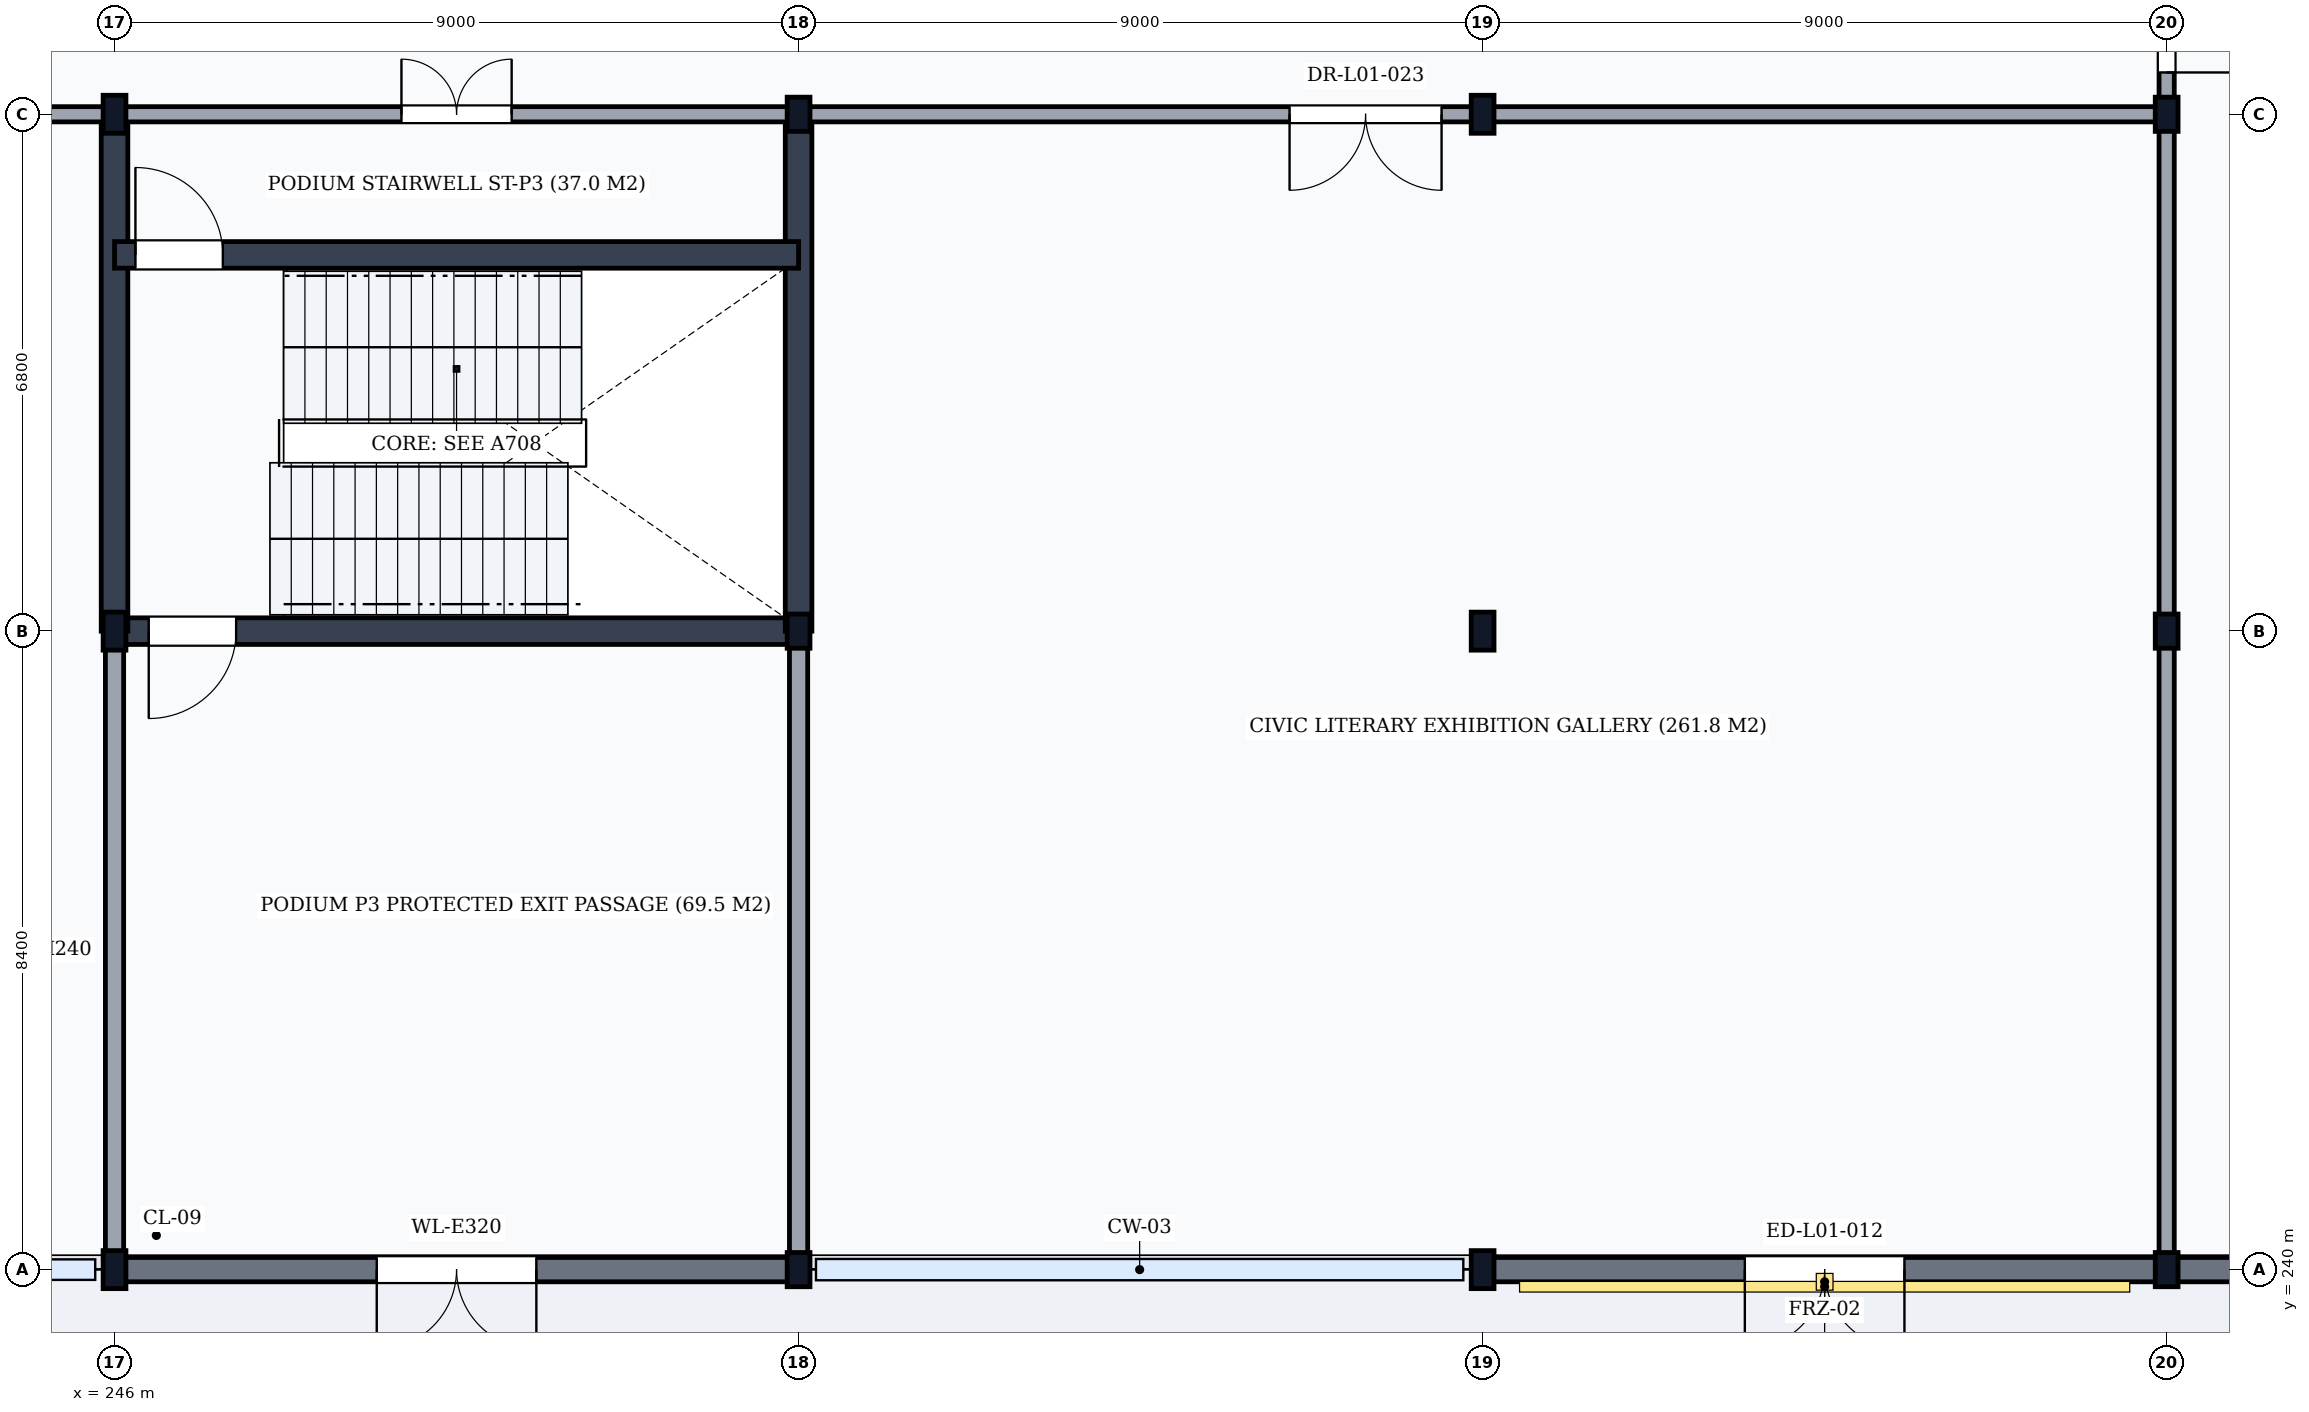
"""IFC4 building model, lengths in metres.
Left out: names, types, materials, properties, quantities, classifications, styles, units other than length and angle.
Written with IfcOpenShell. Run it as: python <this file> out.ifc"""

import sys

from ifc_helpers import new_model, si_unit, direction, frame, frame_2d, origin, origin_2d, place, context, subcontext, project, spatial, rectangle, i_section, extrude, element, fill, save


model = new_model("IFC4")
c1 = context("Model", 3, precision=1e-05, world=origin(), true_north=direction((0.0, 1.0)))
c2 = subcontext(c1, "Body", "Model", "MODEL_VIEW")
j1 = project(units=[si_unit("LENGTHUNIT", "METRE"), si_unit("PLANEANGLEUNIT", "RADIAN")], contexts=[c1])
p1 = place(None, origin())
s1 = spatial("IfcSite", under=j1, at=p1, CompositionType="ELEMENT")
p2 = place(p1, origin())
s2 = spatial("IfcBuilding", under=s1, at=p2, CompositionType="ELEMENT")
p3 = place(p2, origin())
s3 = spatial("IfcBuildingStorey", under=s2, at=p3, CompositionType="ELEMENT", Elevation=0.0)
for number, where, z_axis, x_axis in (
    (1, (246.0, 240.0, 0.0), (0.0, 0.0, 1.0), (1.0, 0.0, 0.0)),
    (2, (246.0, 248.4, 0.0), (0.0, 0.0, 1.0), (1.0, 0.0, 0.0)),
    (3, (246.0, 255.2, 0.0), (0.0, 0.0, 1.0), (1.0, 0.0, 0.0)),
):
    element("IfcColumn", number, at=place(p3, frame(where, z_axis=z_axis, x_axis=x_axis)), inside=s3, PredefinedType="COLUMN", context=c2, shape_type="SweptSolid", body=[
        extrude(i_section(OverallWidth=0.3, OverallDepth=0.5, WebThickness=0.014, FlangeThickness=0.028, FilletRadius=0.027, at=origin_2d()), origin(), (0.0, 0.0, 1.0), 5.4),
    ])
for number, where, z_axis, x_axis in (
    (4, (255.0, 240.0, 0.0), (0.0, 0.0, 1.0), (1.0, 0.0, 0.0)),
    (5, (255.0, 248.4, 0.0), (0.0, 0.0, 1.0), (1.0, 0.0, 0.0)),
    (6, (255.0, 255.2, 0.0), (0.0, 0.0, 1.0), (1.0, 0.0, 0.0)),
):
    element("IfcColumn", number, at=place(p3, frame(where, z_axis=z_axis, x_axis=x_axis)), inside=s3, PredefinedType="COLUMN", context=c2, shape_type="SweptSolid", body=[
        extrude(i_section(OverallWidth=0.3, OverallDepth=0.45, WebThickness=0.014, FlangeThickness=0.026, FilletRadius=0.027, at=origin_2d()), origin(), (0.0, 0.0, 1.0), 5.4),
    ])
for number, where, z_axis, x_axis in (
    (7, (264.0, 240.0, 0.0), (0.0, 0.0, 1.0), (1.0, 0.0, 0.0)),
    (8, (264.0, 248.4, 0.0), (0.0, 0.0, 1.0), (1.0, 0.0, 0.0)),
    (9, (264.0, 255.2, 0.0), (0.0, 0.0, 1.0), (1.0, 0.0, 0.0)),
):
    element("IfcColumn", number, at=place(p3, frame(where, z_axis=z_axis, x_axis=x_axis)), inside=s3, PredefinedType="COLUMN", context=c2, shape_type="SweptSolid", body=[
        extrude(i_section(OverallWidth=0.3, OverallDepth=0.5, WebThickness=0.014, FlangeThickness=0.028, FilletRadius=0.027, at=origin_2d()), origin(), (0.0, 0.0, 1.0), 5.4),
    ])
for number, where, z_axis, x_axis in (
    (10, (273.0, 240.0, 0.0), (0.0, 0.0, 1.0), (1.0, 0.0, 0.0)),
    (11, (273.0, 248.4, 0.0), (0.0, 0.0, 1.0), (1.0, 0.0, 0.0)),
    (12, (273.0, 255.2, 0.0), (0.0, 0.0, 1.0), (1.0, 0.0, 0.0)),
):
    element("IfcColumn", number, at=place(p3, frame(where, z_axis=z_axis, x_axis=x_axis)), inside=s3, PredefinedType="COLUMN", context=c2, shape_type="SweptSolid", body=[
        extrude(i_section(OverallWidth=0.3, OverallDepth=0.45, WebThickness=0.014, FlangeThickness=0.026, FilletRadius=0.027, at=origin_2d()), origin(), (0.0, 0.0, 1.0), 5.4),
    ])
p4 = place(p3, frame((246.006, 240.0, 0.0), z_axis=(0.0, 0.0, 1.0), x_axis=(1.0, 0.0, 0.0)))
e13 = element("IfcWall", 13, at=p4, inside=s3, PredefinedType="SOLIDWALL", context=c2, shape_type="SweptSolid", body=[
    extrude(rectangle(XDim=8.988, YDim=0.32, at=frame_2d((4.494, 0.0))), origin(), (0.0, 0.0, 1.0), 4.798),
])
p5 = place(p4, frame((3.444, 0.0, 0.0)))
e14 = element("IfcOpeningElement", 14, at=p5, cuts=e13, PredefinedType="OPENING", context=c2, shape_type="SweptSolid", body=[
    extrude(rectangle(XDim=2.1, YDim=2.7, at=frame_2d((1.05, 1.35))), frame((0.0, 0.175, 0.0), z_axis=(0.0, -1.0, 0.0), x_axis=(1.0, 0.0, 0.0)), (0.0, 0.0, 1.0), 0.35),
])
p6 = place(p3, frame((264.006, 240.0, 0.0), z_axis=(0.0, 0.0, 1.0), x_axis=(1.0, 0.0, 0.0)))
e15 = element("IfcWall", 15, at=p6, inside=s3, PredefinedType="SOLIDWALL", context=c2, shape_type="SweptSolid", body=[
    extrude(rectangle(XDim=8.988, YDim=0.32, at=frame_2d((4.494, 0.0))), origin(), (0.0, 0.0, 1.0), 4.798),
])
p7 = place(p6, frame((3.444, 0.0, 0.0)))
e16 = element("IfcOpeningElement", 16, at=p7, cuts=e15, PredefinedType="OPENING", context=c2, shape_type="SweptSolid", body=[
    extrude(rectangle(XDim=2.1, YDim=2.7, at=frame_2d((1.05, 1.35))), frame((0.0, 0.175, 0.0), z_axis=(0.0, -1.0, 0.0), x_axis=(1.0, 0.0, 0.0)), (0.0, 0.0, 1.0), 0.35),
])
p8 = place(p3, frame((273.006, 240.0, 0.0), z_axis=(0.0, 0.0, 1.0), x_axis=(1.0, 0.0, 0.0)))
e17 = element("IfcWall", 17, at=p8, inside=s3, PredefinedType="SOLIDWALL", context=c2, shape_type="SweptSolid", body=[
    extrude(rectangle(XDim=8.988, YDim=0.32, at=frame_2d((4.494, 0.0))), origin(), (0.0, 0.0, 1.0), 4.798),
])
p9 = place(p8, frame((3.444, 0.0, 0.0)))
e18 = element("IfcOpeningElement", 18, at=p9, cuts=e17, PredefinedType="OPENING", context=c2, shape_type="SweptSolid", body=[
    extrude(rectangle(XDim=2.1, YDim=2.7, at=frame_2d((1.05, 1.35))), frame((0.0, 0.175, 0.0), z_axis=(0.0, -1.0, 0.0), x_axis=(1.0, 0.0, 0.0)), (0.0, 0.0, 1.0), 0.35),
])
p10 = place(p3, frame((120.1, 240.1, 5.4), z_axis=(0.0, 0.0, 1.0), x_axis=(1.0, 0.0, 0.0)))
e19 = element("IfcWall", 19, at=p10, inside=s3, PredefinedType="PARAPET", context=c2, shape_type="SweptSolid", body=[
    extrude(rectangle(XDim=167.8, YDim=0.18, at=frame_2d((83.9, 0.0))), origin(), (0.0, 0.0, 1.0), 1.2),
])
p11 = place(p3, frame((246.0, 248.4, 0.0), z_axis=(0.0, 0.0, 1.0), x_axis=(1.0, 0.0, 0.0)))
e20 = element("IfcWall", 20, at=p11, inside=s3, PredefinedType="SHEAR", context=c2, shape_type="SweptSolid", body=[
    extrude(rectangle(XDim=9.0, YDim=0.35, at=frame_2d((4.5, 0.0))), origin(), (0.0, 0.0, 1.0), 5.14),
])
p12 = place(p11, frame((0.45, 0.0, 0.0)))
e21 = element("IfcOpeningElement", 21, at=p12, cuts=e20, PredefinedType="OPENING", context=c2, shape_type="SweptSolid", body=[
    extrude(rectangle(XDim=1.15, YDim=2.15, at=frame_2d((0.575, 1.075))), frame((0.0, 0.19, 0.0), z_axis=(0.0, -1.0, 0.0), x_axis=(1.0, 0.0, 0.0)), (0.0, 0.0, 1.0), 0.38),
])
for number, where, z_axis, x_axis in (
    (22, (246.0, 248.4, 0.0), (0.0, 0.0, 1.0), (0.0, 1.0, 0.0)),
    (23, (255.0, 248.4, 0.0), (0.0, 0.0, 1.0), (0.0, 1.0, 0.0)),
):
    element("IfcWall", number, at=place(p3, frame(where, z_axis=z_axis, x_axis=x_axis)), inside=s3, PredefinedType="SHEAR", context=c2, shape_type="SweptSolid", body=[
        extrude(rectangle(XDim=6.8, YDim=0.35, at=frame_2d((3.4, 0.0))), origin(), (0.0, 0.0, 1.0), 5.14),
    ])
p13 = place(p3, frame((246.0, 253.35, 0.0), z_axis=(0.0, 0.0, 1.0), x_axis=(1.0, 0.0, 0.0)))
e24 = element("IfcWall", 24, at=p13, inside=s3, PredefinedType="SHEAR", context=c2, shape_type="SweptSolid", body=[
    extrude(rectangle(XDim=9.0, YDim=0.35, at=frame_2d((4.5, 0.0))), origin(), (0.0, 0.0, 1.0), 5.14),
])
p14 = place(p13, frame((0.275, 0.0, 0.0)))
e25 = element("IfcOpeningElement", 25, at=p14, cuts=e24, PredefinedType="OPENING", context=c2, shape_type="SweptSolid", body=[
    extrude(rectangle(XDim=1.15, YDim=2.15, at=frame_2d((0.575, 1.075))), frame((0.0, 0.19, 0.0), z_axis=(0.0, -1.0, 0.0), x_axis=(1.0, 0.0, 0.0)), (0.0, 0.0, 1.0), 0.38),
])
p15 = place(p3, frame((246.0, 255.2, 0.0), z_axis=(0.0, 0.0, 1.0), x_axis=(1.0, 0.0, 0.0)))
e26 = element("IfcWall", 26, at=p15, inside=s3, PredefinedType="PARTITIONING", context=c2, shape_type="SweptSolid", body=[
    extrude(rectangle(XDim=9.0, YDim=0.2, at=frame_2d((4.5, 0.0))), origin(), (0.0, 0.0, 1.0), 4.588),
])
p16 = place(p15, frame((3.775, 0.0, 0.0)))
e27 = element("IfcOpeningElement", 27, at=p16, cuts=e26, PredefinedType="OPENING", context=c2, shape_type="SweptSolid", body=[
    extrude(rectangle(XDim=1.45, YDim=2.2, at=frame_2d((0.725, 1.1))), frame((0.0, 0.115, 0.0), z_axis=(0.0, -1.0, 0.0), x_axis=(1.0, 0.0, 0.0)), (0.0, 0.0, 1.0), 0.23),
])
for number, where, z_axis, x_axis in (
    (28, (246.0, 240.0, 0.0), (0.0, 0.0, 1.0), (0.0, 1.0, 0.0)),
    (29, (255.0, 240.0, 0.0), (0.0, 0.0, 1.0), (0.0, 1.0, 0.0)),
):
    element("IfcWall", number, at=place(p3, frame(where, z_axis=z_axis, x_axis=x_axis)), inside=s3, PredefinedType="PARTITIONING", context=c2, shape_type="SweptSolid", body=[
        extrude(rectangle(XDim=8.4, YDim=0.24, at=frame_2d((4.2, 0.0))), origin(), (0.0, 0.0, 1.0), 4.688),
    ])
p17 = place(p3, frame((237.0, 255.2, 0.0), z_axis=(0.0, 0.0, 1.0), x_axis=(1.0, 0.0, 0.0)))
e30 = element("IfcWall", 30, at=p17, inside=s3, PredefinedType="PARTITIONING", context=c2, shape_type="SweptSolid", body=[
    extrude(rectangle(XDim=9.0, YDim=0.2, at=frame_2d((4.5, 0.0))), origin(), (0.0, 0.0, 1.0), 4.588),
])
p18 = place(p17, frame((3.5, 0.0, 0.0)))
e31 = element("IfcOpeningElement", 31, at=p18, cuts=e30, PredefinedType="OPENING", context=c2, shape_type="SweptSolid", body=[
    extrude(rectangle(XDim=2.0, YDim=2.4, at=frame_2d((1.0, 1.2))), frame((0.0, 0.115, 0.0), z_axis=(0.0, -1.0, 0.0), x_axis=(1.0, 0.0, 0.0)), (0.0, 0.0, 1.0), 0.23),
])
p19 = place(p3, frame((255.0, 255.2, 0.0), z_axis=(0.0, 0.0, 1.0), x_axis=(1.0, 0.0, 0.0)))
e32 = element("IfcWall", 32, at=p19, inside=s3, PredefinedType="PARTITIONING", context=c2, shape_type="SweptSolid", body=[
    extrude(rectangle(XDim=18.0, YDim=0.2, at=frame_2d((9.0, 0.0))), origin(), (0.0, 0.0, 1.0), 4.588),
])
p20 = place(p19, frame((6.46, 0.0, 0.0)))
e33 = element("IfcOpeningElement", 33, at=p20, cuts=e32, PredefinedType="OPENING", context=c2, shape_type="SweptSolid", body=[
    extrude(rectangle(XDim=2.0, YDim=2.4, at=frame_2d((1.0, 1.2))), frame((0.0, 0.115, 0.0), z_axis=(0.0, -1.0, 0.0), x_axis=(1.0, 0.0, 0.0)), (0.0, 0.0, 1.0), 0.23),
])
p21 = place(p3, frame((273.0, 240.0, 0.0), z_axis=(0.0, 0.0, 1.0), x_axis=(0.0, 1.0, 0.0)))
e34 = element("IfcWall", 34, at=p21, inside=s3, PredefinedType="PARTITIONING", context=c2, shape_type="SweptSolid", body=[
    extrude(rectangle(XDim=18.2, YDim=0.2, at=frame_2d((9.1, 0.0))), origin(), (0.0, 0.0, 1.0), 4.688),
])
p22 = place(p21, frame((15.75, 0.0, 0.0)))
e35 = element("IfcOpeningElement", 35, at=p22, cuts=e34, PredefinedType="OPENING", context=c2, shape_type="SweptSolid", body=[
    extrude(rectangle(XDim=1.8, YDim=2.4, at=frame_2d((0.9, 1.2))), frame((0.0, 0.115, 0.0), z_axis=(0.0, -1.0, 0.0), x_axis=(1.0, 0.0, 0.0)), (0.0, 0.0, 1.0), 0.23),
])
p23 = place(p5, frame((2.1, 0.0, 0.0), z_axis=(0.0, 0.0, 1.0), x_axis=(-1.0, 0.0, 0.0)))
e36 = element("IfcDoor", 36, at=p23, inside=s3, OperationType="DOUBLE_DOOR_SINGLE_SWING", PredefinedType="DOOR", context=c2, shape_type="SweptSolid", body=[
    extrude(rectangle(XDim=2.1, YDim=2.7, at=frame_2d((1.05, 1.35))), frame((0.0, 0.025, 0.0), z_axis=(0.0, -1.0, 0.0), x_axis=(1.0, 0.0, 0.0)), (0.0, 0.0, 1.0), 0.05),
])
fill(e14, e36)
p24 = place(p7, frame((2.1, 0.0, 0.0), z_axis=(0.0, 0.0, 1.0), x_axis=(-1.0, 0.0, 0.0)))
e37 = element("IfcDoor", 37, at=p24, inside=s3, OperationType="DOUBLE_DOOR_SINGLE_SWING", PredefinedType="DOOR", context=c2, shape_type="SweptSolid", body=[
    extrude(rectangle(XDim=2.1, YDim=2.7, at=frame_2d((1.05, 1.35))), frame((0.0, 0.025, 0.0), z_axis=(0.0, -1.0, 0.0), x_axis=(1.0, 0.0, 0.0)), (0.0, 0.0, 1.0), 0.05),
])
fill(e16, e37)
p25 = place(p14, origin())
e38 = element("IfcDoor", 38, at=p25, inside=s3, OperationType="SINGLE_SWING_LEFT", PredefinedType="DOOR", context=c2, shape_type="SweptSolid", body=[
    extrude(rectangle(XDim=1.15, YDim=2.15, at=frame_2d((0.575, 1.075))), frame((0.0, 0.025, 0.0), z_axis=(0.0, -1.0, 0.0), x_axis=(1.0, 0.0, 0.0)), (0.0, 0.0, 1.0), 0.05),
])
fill(e25, e38)
p26 = place(p12, frame((1.15, 0.0, 0.0), z_axis=(0.0, 0.0, 1.0), x_axis=(-1.0, 0.0, 0.0)))
e39 = element("IfcDoor", 39, at=p26, inside=s3, OperationType="SINGLE_SWING_RIGHT", PredefinedType="DOOR", context=c2, shape_type="SweptSolid", body=[
    extrude(rectangle(XDim=1.15, YDim=2.15, at=frame_2d((0.575, 1.075))), frame((0.0, 0.025, 0.0), z_axis=(0.0, -1.0, 0.0), x_axis=(1.0, 0.0, 0.0)), (0.0, 0.0, 1.0), 0.05),
])
fill(e21, e39)
p27 = place(p16, origin())
e40 = element("IfcDoor", 40, at=p27, inside=s3, OperationType="DOUBLE_DOOR_SINGLE_SWING", PredefinedType="DOOR", context=c2, shape_type="SweptSolid", body=[
    extrude(rectangle(XDim=1.45, YDim=2.2, at=frame_2d((0.725, 1.1))), frame((0.0, 0.025, 0.0), z_axis=(0.0, -1.0, 0.0), x_axis=(1.0, 0.0, 0.0)), (0.0, 0.0, 1.0), 0.05),
])
fill(e27, e40)
p28 = place(p20, frame((2.0, 0.0, 0.0), z_axis=(0.0, 0.0, 1.0), x_axis=(-1.0, 0.0, 0.0)))
e41 = element("IfcDoor", 41, at=p28, inside=s3, OperationType="DOUBLE_DOOR_SINGLE_SWING", PredefinedType="DOOR", context=c2, shape_type="SweptSolid", body=[
    extrude(rectangle(XDim=2.0, YDim=2.4, at=frame_2d((1.0, 1.2))), frame((0.0, 0.025, 0.0), z_axis=(0.0, -1.0, 0.0), x_axis=(1.0, 0.0, 0.0)), (0.0, 0.0, 1.0), 0.05),
])
fill(e33, e41)
p29 = place(p22, frame((1.8, 0.0, 0.0), z_axis=(0.0, 0.0, 1.0), x_axis=(-1.0, 0.0, 0.0)))
e42 = element("IfcDoor", 42, at=p29, inside=s3, OperationType="DOUBLE_DOOR_SINGLE_SWING", PredefinedType="DOOR", context=c2, shape_type="SweptSolid", body=[
    extrude(rectangle(XDim=1.8, YDim=2.4, at=frame_2d((0.9, 1.2))), frame((0.0, 0.025, 0.0), z_axis=(0.0, -1.0, 0.0), x_axis=(1.0, 0.0, 0.0)), (0.0, 0.0, 1.0), 0.05),
])
fill(e35, e42)
save(model, sys.argv[1])
